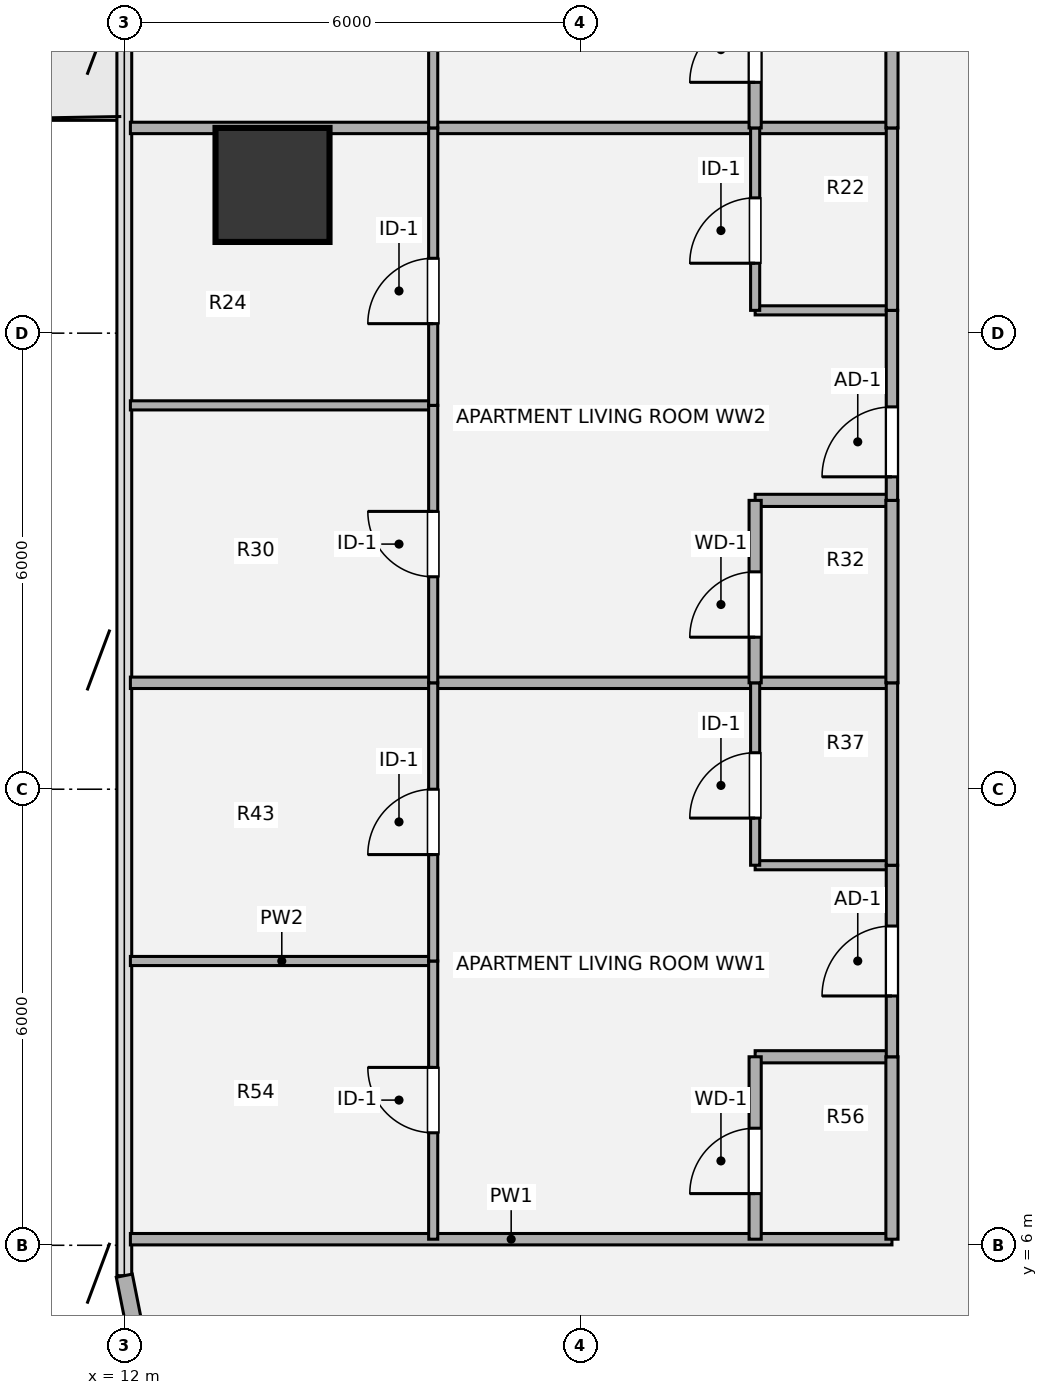
"""IFC4 building model, lengths in metres.
Left out: names, types, materials, properties, quantities, classifications, styles, units other than length and angle.
Written with IfcOpenShell. Run it as: python <this file> out.ifc"""

import sys

from ifc_helpers import new_model, si_unit, direction, frame, frame_2d, origin, origin_2d, place, context, subcontext, project, spatial, rectangle, hollow_circle, extrude, source, transform, mapped, element, fill, save


model = new_model("IFC4")
c1 = context("Model", 3, precision=1e-05, world=origin(), true_north=direction((0.0, 1.0)))
c2 = subcontext(c1, "Body", "Model", "MODEL_VIEW")
j1 = project(units=[si_unit("LENGTHUNIT", "METRE"), si_unit("PLANEANGLEUNIT", "RADIAN")], contexts=[c1])
p1 = place(None, origin())
s1 = spatial("IfcSite", under=j1, at=p1, CompositionType="ELEMENT")
p2 = place(p1, origin())
s2 = spatial("IfcBuilding", under=s1, at=p2, CompositionType="ELEMENT")
p3 = place(p2, frame((0.0, 0.0, 34.56)))
s3 = spatial("IfcBuildingStorey", under=s2, at=p3, CompositionType="ELEMENT", Elevation=34.56)
m1 = source(origin(), c2, "Body", "SweptSolid", [
    extrude(hollow_circle(Radius=0.75, WallThickness=0.05, at=origin_2d()), origin(), (0.0, 0.0, 1.0), 3.78),
])
p4 = place(p3, frame((13.95, 19.95, 0.0), z_axis=(0.0, 0.0, 1.0), x_axis=(1.0, 0.0, 0.0)))
e1 = element("IfcColumn", 1, at=p4, inside=s3, PredefinedType="COLUMN", context=c2, shape_type="MappedRepresentation", body=[
    mapped(m1, transform((0.0, 0.0, 0.0), x_axis=(1.0, 0.0, 0.0), y_axis=(0.0, 1.0, 0.0), z_axis=(0.0, 0.0, 1.0), scale=1.0)),
])
p5 = place(p3, frame((12.244, 4.375, 0.0), z_axis=(0.0, 0.0, 1.0), x_axis=(-0.195138390419, 0.980775717779, 0.0)))
e2 = element("IfcWall", 2, at=p5, inside=s3, PredefinedType="SOLIDWALL", context=c2, shape_type="SweptSolid", body=[
    extrude(rectangle(XDim=1.249, YDim=0.215, at=frame_2d((0.624, 0.0))), origin(), (0.0, 0.0, 1.0), 3.53),
])
p6 = place(p3, frame((12.08, 6.08, 0.0), z_axis=(0.0, 0.0, 1.0), x_axis=(1.0, 0.0, 0.0)))
e3 = element("IfcWall", 3, at=p6, inside=s3, PredefinedType="PARTITIONING", context=c2, shape_type="SweptSolid", body=[
    extrude(rectangle(XDim=10.02, YDim=0.15, at=frame_2d((5.01, 0.0))), origin(), (0.0, 0.0, 1.0), 3.5),
])
p7 = place(p3, frame((20.3, 8.48, 0.0), z_axis=(0.0, 0.0, 1.0), x_axis=(1.0, 0.0, 0.0)))
e4 = element("IfcWall", 4, at=p7, inside=s3, PredefinedType="PLUMBINGWALL", context=c2, shape_type="SweptSolid", body=[
    extrude(rectangle(XDim=1.8, YDim=0.16, at=frame_2d((0.9, 0.0))), origin(), (0.0, 0.0, 1.0), 3.5),
])
p8 = place(p3, frame((12.08, 9.74, 0.0), z_axis=(0.0, 0.0, 1.0), x_axis=(1.0, 0.0, 0.0)))
e5 = element("IfcWall", 5, at=p8, inside=s3, PredefinedType="PARTITIONING", context=c2, shape_type="SweptSolid", body=[
    extrude(rectangle(XDim=3.984, YDim=0.12, at=frame_2d((1.992, 0.0))), origin(), (0.0, 0.0, 1.0), 3.5),
])
p9 = place(p3, frame((20.3, 11.0, 0.0), z_axis=(0.0, 0.0, 1.0), x_axis=(1.0, 0.0, 0.0)))
e6 = element("IfcWall", 6, at=p9, inside=s3, PredefinedType="PARTITIONING", context=c2, shape_type="SweptSolid", body=[
    extrude(rectangle(XDim=1.8, YDim=0.12, at=frame_2d((0.9, 0.0))), origin(), (0.0, 0.0, 1.0), 3.5),
])
p10 = place(p3, frame((12.08, 13.4, 0.0), z_axis=(0.0, 0.0, 1.0), x_axis=(1.0, 0.0, 0.0)))
e7 = element("IfcWall", 7, at=p10, inside=s3, PredefinedType="PARTITIONING", context=c2, shape_type="SweptSolid", body=[
    extrude(rectangle(XDim=10.02, YDim=0.15, at=frame_2d((5.01, 0.0))), origin(), (0.0, 0.0, 1.0), 3.5),
])
p11 = place(p3, frame((20.3, 15.8, 0.0), z_axis=(0.0, 0.0, 1.0), x_axis=(1.0, 0.0, 0.0)))
e8 = element("IfcWall", 8, at=p11, inside=s3, PredefinedType="PLUMBINGWALL", context=c2, shape_type="SweptSolid", body=[
    extrude(rectangle(XDim=1.8, YDim=0.16, at=frame_2d((0.9, 0.0))), origin(), (0.0, 0.0, 1.0), 3.5),
])
p12 = place(p3, frame((12.08, 17.05, 0.0), z_axis=(0.0, 0.0, 1.0), x_axis=(1.0, 0.0, 0.0)))
e9 = element("IfcWall", 9, at=p12, inside=s3, PredefinedType="PARTITIONING", context=c2, shape_type="SweptSolid", body=[
    extrude(rectangle(XDim=3.984, YDim=0.12, at=frame_2d((1.992, 0.0))), origin(), (0.0, 0.0, 1.0), 3.5),
])
p13 = place(p3, frame((20.3, 18.3, 0.0), z_axis=(0.0, 0.0, 1.0), x_axis=(1.0, 0.0, 0.0)))
e10 = element("IfcWall", 10, at=p13, inside=s3, PredefinedType="PARTITIONING", context=c2, shape_type="SweptSolid", body=[
    extrude(rectangle(XDim=1.8, YDim=0.12, at=frame_2d((0.9, 0.0))), origin(), (0.0, 0.0, 1.0), 2.715),
])
p14 = place(p3, frame((12.08, 20.7, 0.0), z_axis=(0.0, 0.0, 1.0), x_axis=(1.0, 0.0, 0.0)))
e11 = element("IfcWall", 11, at=p14, inside=s3, PredefinedType="PARTITIONING", context=c2, shape_type="SweptSolid", body=[
    extrude(rectangle(XDim=10.02, YDim=0.15, at=frame_2d((5.01, 0.0))), origin(), (0.0, 0.0, 1.0), 2.982),
])
p15 = place(p3, frame((16.064, 6.08, 0.0), z_axis=(0.0, 0.0, 1.0), x_axis=(0.0, 1.0, 0.0)))
e12 = element("IfcWall", 12, at=p15, inside=s3, PredefinedType="PARTITIONING", context=c2, shape_type="SweptSolid", body=[
    extrude(rectangle(XDim=3.66, YDim=0.12, at=frame_2d((1.83, 0.0))), origin(), (0.0, 0.0, 1.0), 3.5),
])
p16 = place(p15, frame((1.4, 0.0, 0.0)))
e13 = element("IfcOpeningElement", 13, at=p16, cuts=e12, PredefinedType="OPENING", context=c2, shape_type="SweptSolid", body=[
    extrude(rectangle(XDim=0.86, YDim=2.1, at=origin_2d()), frame((0.43, 0.07, 1.05), z_axis=(0.0, -1.0, 0.0), x_axis=(1.0, 0.0, 0.0)), (0.0, 0.0, 1.0), 0.14),
])
p17 = place(p3, frame((16.064, 9.74, 0.0), z_axis=(0.0, 0.0, 1.0), x_axis=(0.0, 1.0, 0.0)))
e14 = element("IfcWall", 14, at=p17, inside=s3, PredefinedType="PARTITIONING", context=c2, shape_type="SweptSolid", body=[
    extrude(rectangle(XDim=3.66, YDim=0.12, at=frame_2d((1.83, 0.0))), origin(), (0.0, 0.0, 1.0), 3.5),
])
p18 = place(p17, frame((1.4, 0.0, 0.0)))
e15 = element("IfcOpeningElement", 15, at=p18, cuts=e14, PredefinedType="OPENING", context=c2, shape_type="SweptSolid", body=[
    extrude(rectangle(XDim=0.86, YDim=2.1, at=origin_2d()), frame((0.43, 0.07, 1.05), z_axis=(0.0, -1.0, 0.0), x_axis=(1.0, 0.0, 0.0)), (0.0, 0.0, 1.0), 0.14),
])
p19 = place(p3, frame((16.064, 13.4, 0.0), z_axis=(0.0, 0.0, 1.0), x_axis=(0.0, 1.0, 0.0)))
e16 = element("IfcWall", 16, at=p19, inside=s3, PredefinedType="PARTITIONING", context=c2, shape_type="SweptSolid", body=[
    extrude(rectangle(XDim=3.65, YDim=0.12, at=frame_2d((1.825, 0.0))), origin(), (0.0, 0.0, 1.0), 3.5),
])
p20 = place(p19, frame((1.395, 0.0, 0.0)))
e17 = element("IfcOpeningElement", 17, at=p20, cuts=e16, PredefinedType="OPENING", context=c2, shape_type="SweptSolid", body=[
    extrude(rectangle(XDim=0.86, YDim=2.1, at=origin_2d()), frame((0.43, 0.07, 1.05), z_axis=(0.0, -1.0, 0.0), x_axis=(1.0, 0.0, 0.0)), (0.0, 0.0, 1.0), 0.14),
])
p21 = place(p3, frame((16.064, 17.05, 0.0), z_axis=(0.0, 0.0, 1.0), x_axis=(0.0, 1.0, 0.0)))
e18 = element("IfcWall", 18, at=p21, inside=s3, PredefinedType="PARTITIONING", context=c2, shape_type="SweptSolid", body=[
    extrude(rectangle(XDim=3.65, YDim=0.12, at=frame_2d((1.825, 0.0))), origin(), (0.0, 0.0, 1.0), 3.5),
])
p22 = place(p21, frame((1.075, 0.0, 0.0)))
e19 = element("IfcOpeningElement", 19, at=p22, cuts=e18, PredefinedType="OPENING", context=c2, shape_type="SweptSolid", body=[
    extrude(rectangle(XDim=0.86, YDim=2.1, at=origin_2d()), frame((0.43, 0.07, 1.05), z_axis=(0.0, -1.0, 0.0), x_axis=(1.0, 0.0, 0.0)), (0.0, 0.0, 1.0), 0.14),
])
p23 = place(p3, frame((16.064, 20.7, 0.0), z_axis=(0.0, 0.0, 1.0), x_axis=(0.0, 1.0, 0.0)))
e20 = element("IfcWall", 20, at=p23, inside=s3, PredefinedType="PARTITIONING", context=c2, shape_type="SweptSolid", body=[
    extrude(rectangle(XDim=3.7, YDim=0.12, at=frame_2d((1.85, 0.0))), origin(), (0.0, 0.0, 1.0), 3.5),
])
p24 = place(p23, frame((1.42, 0.0, 0.0)))
e21 = element("IfcOpeningElement", 21, at=p24, cuts=e20, PredefinedType="OPENING", context=c2, shape_type="SweptSolid", body=[
    extrude(rectangle(XDim=0.86, YDim=2.1, at=origin_2d()), frame((0.43, 0.07, 1.05), z_axis=(0.0, -1.0, 0.0), x_axis=(1.0, 0.0, 0.0)), (0.0, 0.0, 1.0), 0.14),
])
p25 = place(p3, frame((20.3, 6.08, 0.0), z_axis=(0.0, 0.0, 1.0), x_axis=(0.0, 1.0, 0.0)))
e22 = element("IfcWall", 22, at=p25, inside=s3, PredefinedType="PLUMBINGWALL", context=c2, shape_type="SweptSolid", body=[
    extrude(rectangle(XDim=2.4, YDim=0.16, at=frame_2d((1.2, 0.0))), origin(), (0.0, 0.0, 1.0), 3.5),
])
p26 = place(p25, frame((0.6, 0.0, 0.0)))
e23 = element("IfcOpeningElement", 23, at=p26, cuts=e22, PredefinedType="OPENING", context=c2, shape_type="SweptSolid", body=[
    extrude(rectangle(XDim=0.86, YDim=2.1, at=origin_2d()), frame((0.43, 0.09, 1.05), z_axis=(0.0, -1.0, 0.0), x_axis=(1.0, 0.0, 0.0)), (0.0, 0.0, 1.0), 0.18),
])
p27 = place(p3, frame((20.3, 11.0, 0.0), z_axis=(0.0, 0.0, 1.0), x_axis=(0.0, 1.0, 0.0)))
e24 = element("IfcWall", 24, at=p27, inside=s3, PredefinedType="PARTITIONING", context=c2, shape_type="SweptSolid", body=[
    extrude(rectangle(XDim=2.4, YDim=0.12, at=frame_2d((1.2, 0.0))), origin(), (0.0, 0.0, 1.0), 3.5),
])
p28 = place(p27, frame((0.62, 0.0, 0.0)))
e25 = element("IfcOpeningElement", 25, at=p28, cuts=e24, PredefinedType="OPENING", context=c2, shape_type="SweptSolid", body=[
    extrude(rectangle(XDim=0.86, YDim=2.1, at=origin_2d()), frame((0.43, 0.07, 1.05), z_axis=(0.0, -1.0, 0.0), x_axis=(1.0, 0.0, 0.0)), (0.0, 0.0, 1.0), 0.14),
])
p29 = place(p3, frame((20.3, 13.4, 0.0), z_axis=(0.0, 0.0, 1.0), x_axis=(0.0, 1.0, 0.0)))
e26 = element("IfcWall", 26, at=p29, inside=s3, PredefinedType="PLUMBINGWALL", context=c2, shape_type="SweptSolid", body=[
    extrude(rectangle(XDim=2.4, YDim=0.16, at=frame_2d((1.2, 0.0))), origin(), (0.0, 0.0, 1.0), 3.5),
])
p30 = place(p29, frame((0.6, 0.0, 0.0)))
e27 = element("IfcOpeningElement", 27, at=p30, cuts=e26, PredefinedType="OPENING", context=c2, shape_type="SweptSolid", body=[
    extrude(rectangle(XDim=0.86, YDim=2.1, at=origin_2d()), frame((0.43, 0.09, 1.05), z_axis=(0.0, -1.0, 0.0), x_axis=(1.0, 0.0, 0.0)), (0.0, 0.0, 1.0), 0.18),
])
p31 = place(p3, frame((20.3, 18.3, 0.0), z_axis=(0.0, 0.0, 1.0), x_axis=(0.0, 1.0, 0.0)))
e28 = element("IfcWall", 28, at=p31, inside=s3, PredefinedType="PARTITIONING", context=c2, shape_type="SweptSolid", body=[
    extrude(rectangle(XDim=2.4, YDim=0.12, at=frame_2d((1.2, 0.0))), origin(), (0.0, 0.0, 1.0), 3.5),
])
p32 = place(p31, frame((0.62, 0.0, 0.0)))
e29 = element("IfcOpeningElement", 29, at=p32, cuts=e28, PredefinedType="OPENING", context=c2, shape_type="SweptSolid", body=[
    extrude(rectangle(XDim=0.86, YDim=2.1, at=origin_2d()), frame((0.43, 0.07, 1.05), z_axis=(0.0, -1.0, 0.0), x_axis=(1.0, 0.0, 0.0)), (0.0, 0.0, 1.0), 0.14),
])
p33 = place(p3, frame((20.3, 20.7, 0.0), z_axis=(0.0, 0.0, 1.0), x_axis=(0.0, 1.0, 0.0)))
e30 = element("IfcWall", 30, at=p33, inside=s3, PredefinedType="PLUMBINGWALL", context=c2, shape_type="SweptSolid", body=[
    extrude(rectangle(XDim=2.4, YDim=0.16, at=frame_2d((1.2, 0.0))), origin(), (0.0, 0.0, 1.0), 3.5),
])
p34 = place(p33, frame((0.6, 0.0, 0.0)))
e31 = element("IfcOpeningElement", 31, at=p34, cuts=e30, PredefinedType="OPENING", context=c2, shape_type="SweptSolid", body=[
    extrude(rectangle(XDim=0.86, YDim=2.1, at=origin_2d()), frame((0.43, 0.09, 1.05), z_axis=(0.0, -1.0, 0.0), x_axis=(1.0, 0.0, 0.0)), (0.0, 0.0, 1.0), 0.18),
])
p35 = place(p3, frame((22.1, 6.08, 0.0), z_axis=(0.0, 0.0, 1.0), x_axis=(0.0, 1.0, 0.0)))
e32 = element("IfcWall", 32, at=p35, inside=s3, PredefinedType="PLUMBINGWALL", context=c2, shape_type="SweptSolid", body=[
    extrude(rectangle(XDim=2.4, YDim=0.16, at=frame_2d((1.2, 0.0))), origin(), (0.0, 0.0, 1.0), 3.5),
])
p36 = place(p3, frame((22.1, 8.48, 0.0), z_axis=(0.0, 0.0, 1.0), x_axis=(0.0, 1.0, 0.0)))
e33 = element("IfcWall", 33, at=p36, inside=s3, PredefinedType="PARTITIONING", context=c2, shape_type="SweptSolid", body=[
    extrude(rectangle(XDim=2.52, YDim=0.15, at=frame_2d((1.26, 0.0))), origin(), (0.0, 0.0, 1.0), 3.5),
])
p37 = place(p36, frame((0.8, 0.0, 0.0)))
e34 = element("IfcOpeningElement", 34, at=p37, cuts=e33, PredefinedType="OPENING", context=c2, shape_type="SweptSolid", body=[
    extrude(rectangle(XDim=0.92, YDim=2.1, at=origin_2d()), frame((0.46, 0.085, 1.05), z_axis=(0.0, -1.0, 0.0), x_axis=(1.0, 0.0, 0.0)), (0.0, 0.0, 1.0), 0.17),
])
p38 = place(p3, frame((22.1, 11.0, 0.0), z_axis=(0.0, 0.0, 1.0), x_axis=(0.0, 1.0, 0.0)))
e35 = element("IfcWall", 35, at=p38, inside=s3, PredefinedType="PARTITIONING", context=c2, shape_type="SweptSolid", body=[
    extrude(rectangle(XDim=2.4, YDim=0.15, at=frame_2d((1.2, 0.0))), origin(), (0.0, 0.0, 1.0), 3.5),
])
p39 = place(p3, frame((22.1, 13.4, 0.0), z_axis=(0.0, 0.0, 1.0), x_axis=(0.0, 1.0, 0.0)))
e36 = element("IfcWall", 36, at=p39, inside=s3, PredefinedType="PLUMBINGWALL", context=c2, shape_type="SweptSolid", body=[
    extrude(rectangle(XDim=2.4, YDim=0.16, at=frame_2d((1.2, 0.0))), origin(), (0.0, 0.0, 1.0), 3.5),
])
p40 = place(p3, frame((22.1, 15.8, 0.0), z_axis=(0.0, 0.0, 1.0), x_axis=(0.0, 1.0, 0.0)))
e37 = element("IfcWall", 37, at=p40, inside=s3, PredefinedType="PARTITIONING", context=c2, shape_type="SweptSolid", body=[
    extrude(rectangle(XDim=2.5, YDim=0.15, at=frame_2d((1.25, 0.0))), origin(), (0.0, 0.0, 1.0), 3.5),
])
p41 = place(p40, frame((0.31, 0.0, 0.0)))
e38 = element("IfcOpeningElement", 38, at=p41, cuts=e37, PredefinedType="OPENING", context=c2, shape_type="SweptSolid", body=[
    extrude(rectangle(XDim=0.92, YDim=2.1, at=origin_2d()), frame((0.46, 0.085, 1.05), z_axis=(0.0, -1.0, 0.0), x_axis=(1.0, 0.0, 0.0)), (0.0, 0.0, 1.0), 0.17),
])
p42 = place(p3, frame((22.1, 18.3, 0.0), z_axis=(0.0, 0.0, 1.0), x_axis=(0.0, 1.0, 0.0)))
e39 = element("IfcWall", 39, at=p42, inside=s3, PredefinedType="PARTITIONING", context=c2, shape_type="SweptSolid", body=[
    extrude(rectangle(XDim=2.4, YDim=0.15, at=frame_2d((1.2, 0.0))), origin(), (0.0, 0.0, 1.0), 3.5),
])
p43 = place(p3, frame((22.1, 20.7, 0.0), z_axis=(0.0, 0.0, 1.0), x_axis=(0.0, 1.0, 0.0)))
e40 = element("IfcWall", 40, at=p43, inside=s3, PredefinedType="PLUMBINGWALL", context=c2, shape_type="SweptSolid", body=[
    extrude(rectangle(XDim=2.4, YDim=0.16, at=frame_2d((1.2, 0.0))), origin(), (0.0, 0.0, 1.0), 3.5),
])
m2 = source(origin(), c2, "Body", "SweptSolid", [
    extrude(rectangle(XDim=0.86, YDim=2.1, at=origin_2d()), frame((0.43, 0.025, 1.05), z_axis=(0.0, -1.0, 0.0), x_axis=(1.0, 0.0, 0.0)), (0.0, 0.0, 1.0), 0.05),
])
p44 = place(p16, origin())
e41 = element("IfcDoor", 41, at=p44, inside=s3, OperationType="SINGLE_SWING_RIGHT", PredefinedType="DOOR", context=c2, shape_type="MappedRepresentation", body=[
    mapped(m2, transform((0.0, 0.0, 0.0), x_axis=(1.0, 0.0, 0.0), y_axis=(0.0, 1.0, 0.0), z_axis=(0.0, 0.0, 1.0), scale=1.0)),
])
fill(e13, e41)
p45 = place(p18, origin())
e42 = element("IfcDoor", 42, at=p45, inside=s3, OperationType="SINGLE_SWING_LEFT", PredefinedType="DOOR", context=c2, shape_type="MappedRepresentation", body=[
    mapped(m2, transform((0.0, 0.0, 0.0), x_axis=(1.0, 0.0, 0.0), y_axis=(0.0, 1.0, 0.0), z_axis=(0.0, 0.0, 1.0), scale=1.0)),
])
fill(e15, e42)
p46 = place(p20, origin())
e43 = element("IfcDoor", 43, at=p46, inside=s3, OperationType="SINGLE_SWING_RIGHT", PredefinedType="DOOR", context=c2, shape_type="MappedRepresentation", body=[
    mapped(m2, transform((0.0, 0.0, 0.0), x_axis=(1.0, 0.0, 0.0), y_axis=(0.0, 1.0, 0.0), z_axis=(0.0, 0.0, 1.0), scale=1.0)),
])
fill(e17, e43)
p47 = place(p22, origin())
e44 = element("IfcDoor", 44, at=p47, inside=s3, OperationType="SINGLE_SWING_LEFT", PredefinedType="DOOR", context=c2, shape_type="MappedRepresentation", body=[
    mapped(m2, transform((0.0, 0.0, 0.0), x_axis=(1.0, 0.0, 0.0), y_axis=(0.0, 1.0, 0.0), z_axis=(0.0, 0.0, 1.0), scale=1.0)),
])
fill(e19, e44)
m3 = source(origin(), c2, "Body", "SweptSolid", [
    extrude(rectangle(XDim=0.86, YDim=2.1, at=origin_2d()), frame((0.43, 0.025, 1.05), z_axis=(0.0, -1.0, 0.0), x_axis=(1.0, 0.0, 0.0)), (0.0, 0.0, 1.0), 0.05),
])
p48 = place(p26, origin())
e45 = element("IfcDoor", 45, at=p48, inside=s3, OperationType="SINGLE_SWING_LEFT", PredefinedType="DOOR", context=c2, shape_type="MappedRepresentation", body=[
    mapped(m3, transform((0.0, 0.0, 0.0), x_axis=(1.0, 0.0, 0.0), y_axis=(0.0, 1.0, 0.0), z_axis=(0.0, 0.0, 1.0), scale=1.0)),
])
fill(e23, e45)
p49 = place(p28, origin())
e46 = element("IfcDoor", 46, at=p49, inside=s3, OperationType="SINGLE_SWING_LEFT", PredefinedType="DOOR", context=c2, shape_type="MappedRepresentation", body=[
    mapped(m2, transform((0.0, 0.0, 0.0), x_axis=(1.0, 0.0, 0.0), y_axis=(0.0, 1.0, 0.0), z_axis=(0.0, 0.0, 1.0), scale=1.0)),
])
fill(e25, e46)
p50 = place(p30, origin())
e47 = element("IfcDoor", 47, at=p50, inside=s3, OperationType="SINGLE_SWING_LEFT", PredefinedType="DOOR", context=c2, shape_type="MappedRepresentation", body=[
    mapped(m3, transform((0.0, 0.0, 0.0), x_axis=(1.0, 0.0, 0.0), y_axis=(0.0, 1.0, 0.0), z_axis=(0.0, 0.0, 1.0), scale=1.0)),
])
fill(e27, e47)
p51 = place(p32, origin())
e48 = element("IfcDoor", 48, at=p51, inside=s3, OperationType="SINGLE_SWING_LEFT", PredefinedType="DOOR", context=c2, shape_type="MappedRepresentation", body=[
    mapped(m2, transform((0.0, 0.0, 0.0), x_axis=(1.0, 0.0, 0.0), y_axis=(0.0, 1.0, 0.0), z_axis=(0.0, 0.0, 1.0), scale=1.0)),
])
fill(e29, e48)
p52 = place(p34, origin())
e49 = element("IfcDoor", 49, at=p52, inside=s3, OperationType="SINGLE_SWING_LEFT", PredefinedType="DOOR", context=c2, shape_type="MappedRepresentation", body=[
    mapped(m3, transform((0.0, 0.0, 0.0), x_axis=(1.0, 0.0, 0.0), y_axis=(0.0, 1.0, 0.0), z_axis=(0.0, 0.0, 1.0), scale=1.0)),
])
fill(e31, e49)
m4 = source(origin(), c2, "Body", "SweptSolid", [
    extrude(rectangle(XDim=0.92, YDim=2.1, at=origin_2d()), frame((0.46, 0.025, 1.05), z_axis=(0.0, -1.0, 0.0), x_axis=(1.0, 0.0, 0.0)), (0.0, 0.0, 1.0), 0.05),
])
p53 = place(p37, origin())
e50 = element("IfcDoor", 50, at=p53, inside=s3, OperationType="SINGLE_SWING_LEFT", PredefinedType="DOOR", context=c2, shape_type="MappedRepresentation", body=[
    mapped(m4, transform((0.0, 0.0, 0.0), x_axis=(1.0, 0.0, 0.0), y_axis=(0.0, 1.0, 0.0), z_axis=(0.0, 0.0, 1.0), scale=1.0)),
])
fill(e34, e50)
p54 = place(p41, origin())
e51 = element("IfcDoor", 51, at=p54, inside=s3, OperationType="SINGLE_SWING_LEFT", PredefinedType="DOOR", context=c2, shape_type="MappedRepresentation", body=[
    mapped(m4, transform((0.0, 0.0, 0.0), x_axis=(1.0, 0.0, 0.0), y_axis=(0.0, 1.0, 0.0), z_axis=(0.0, 0.0, 1.0), scale=1.0)),
])
fill(e38, e51)
save(model, sys.argv[1])
